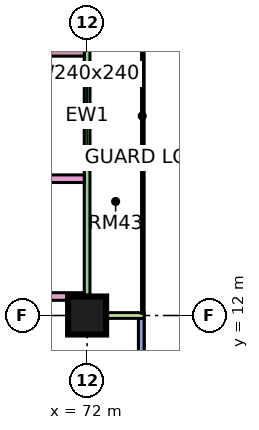
"""IFC4 building model, lengths in metres.
Left out: names, types, materials, properties, quantities, classifications, styles, units other than length and angle.
Written with IfcOpenShell. Run it as: python <this file> out.ifc"""

import sys

from ifc_helpers import new_model, si_unit, direction, frame, frame_2d, origin, origin_2d, place, context, subcontext, project, spatial, rectangle, extrude, element, fill, save


model = new_model("IFC4")
c1 = context("Model", 3, precision=1e-05, world=origin(), true_north=direction((0.0, 1.0)))
c2 = subcontext(c1, "Body", "Model", "MODEL_VIEW")
j1 = project(units=[si_unit("LENGTHUNIT", "METRE"), si_unit("PLANEANGLEUNIT", "RADIAN")], contexts=[c1])
p1 = place(None, origin())
s1 = spatial("IfcSite", under=j1, at=p1, CompositionType="ELEMENT")
p2 = place(p1, origin())
s2 = spatial("IfcBuilding", under=s1, at=p2, CompositionType="ELEMENT")
p3 = place(p2, frame((0.0, 0.0, 114.4)))
s3 = spatial("IfcBuildingStorey", under=s2, at=p3, CompositionType="ELEMENT", Elevation=114.4)
p4 = place(p3, frame((72.0, 12.0, 0.0), z_axis=(0.0, 0.0, 1.0), x_axis=(1.0, 0.0, 0.0)))
e1 = element("IfcColumn", 1, at=p4, inside=s3, PredefinedType="COLUMN", context=c2, shape_type="SweptSolid", body=[
    extrude(rectangle(XDim=1.0, YDim=1.0, at=origin_2d()), origin(), (0.0, 0.0, 1.0), 3.75),
])
p5 = place(p3, frame((73.425, 1.5, 0.0), z_axis=(0.0, 0.0, 1.0), x_axis=(0.0, 1.0, 0.0)))
e2 = element("IfcWall", 2, at=p5, inside=s3, PredefinedType="SOLIDWALL", context=c2, shape_type="SweptSolid", body=[
    extrude(rectangle(XDim=10.425, YDim=0.15, at=frame_2d((5.212, 0.0))), origin(), (0.0, 0.0, 1.0), 3.35),
])
p6 = place(p5, frame((1.3, 0.0, 0.45)))
e3 = element("IfcOpeningElement", 3, at=p6, cuts=e2, PredefinedType="OPENING", context=c2, shape_type="SweptSolid", body=[
    extrude(rectangle(XDim=3.0, YDim=2.4, at=frame_2d((1.5, 1.2))), frame((0.0, 0.085, 0.0), z_axis=(0.0, -1.0, 0.0), x_axis=(1.0, 0.0, 0.0)), (0.0, 0.0, 1.0), 0.17),
])
p7 = place(p5, frame((8.012, 0.0, 1.7)))
e4 = element("IfcOpeningElement", 4, at=p7, cuts=e2, PredefinedType="OPENING", context=c2, shape_type="SweptSolid", body=[
    extrude(rectangle(XDim=1.2, YDim=0.9, at=frame_2d((0.6, 0.45))), frame((0.0, 0.085, 0.0), z_axis=(0.0, -1.0, 0.0), x_axis=(1.0, 0.0, 0.0)), (0.0, 0.0, 1.0), 0.17),
])
p8 = place(p3, frame((72.0, 12.075, 0.0), z_axis=(0.0, 0.0, 1.0), x_axis=(0.0, 1.0, 0.0)))
e5 = element("IfcWall", 5, at=p8, inside=s3, PredefinedType="SOLIDWALL", context=c2, shape_type="SweptSolid", body=[
    extrude(rectangle(XDim=10.35, YDim=0.15, at=frame_2d((5.175, 0.0))), origin(), (0.0, 0.0, 1.0), 3.35),
])
p9 = place(p8, frame((3.975, 0.0, 0.45)))
e6 = element("IfcOpeningElement", 6, at=p9, cuts=e5, PredefinedType="OPENING", context=c2, shape_type="SweptSolid", body=[
    extrude(rectangle(XDim=2.4, YDim=2.4, at=frame_2d((1.2, 1.2))), frame((0.0, 0.085, 0.0), z_axis=(0.0, -1.0, 0.0), x_axis=(1.0, 0.0, 0.0)), (0.0, 0.0, 1.0), 0.17),
])
p10 = place(p8, frame((7.688, 0.0, 0.0)))
e7 = element("IfcOpeningElement", 7, at=p10, cuts=e5, PredefinedType="OPENING", context=c2, shape_type="SweptSolid", body=[
    extrude(rectangle(XDim=1.8, YDim=2.4, at=frame_2d((0.9, 1.2))), frame((0.0, 0.085, 0.0), z_axis=(0.0, -1.0, 0.0), x_axis=(1.0, 0.0, 0.0)), (0.0, 0.0, 1.0), 0.17),
])
p11 = place(p3, frame((73.5, 12.0, 0.0), z_axis=(0.0, 0.0, 1.0), x_axis=(-1.0, 0.0, 0.0)))
e8 = element("IfcWall", 8, at=p11, inside=s3, PredefinedType="SOLIDWALL", context=c2, shape_type="SweptSolid", body=[
    extrude(rectangle(XDim=1.5, YDim=0.15, at=frame_2d((0.75, 0.0))), origin(), (0.0, 0.0, 1.0), 3.35),
])
p12 = place(p3, frame((40.65, 12.5, 0.0), z_axis=(0.0, 0.0, 1.0), x_axis=(1.0, 0.0, 0.0)))
e9 = element("IfcWall", 9, at=p12, inside=s3, PredefinedType="PARTITIONING", context=c2, shape_type="SweptSolid", body=[
    extrude(rectangle(XDim=31.276, YDim=0.2, at=frame_2d((15.638, 0.0))), origin(), (0.0, 0.0, 1.0), 3.35),
])
p13 = place(p12, frame((20.7, 0.0, 0.0)))
e10 = element("IfcOpeningElement", 10, at=p13, cuts=e9, PredefinedType="OPENING", context=c2, shape_type="SweptSolid", body=[
    extrude(rectangle(XDim=1.0, YDim=2.1, at=frame_2d((0.5, 1.05))), frame((0.0, 0.11, 0.0), z_axis=(0.0, -1.0, 0.0), x_axis=(1.0, 0.0, 0.0)), (0.0, 0.0, 1.0), 0.22),
])
p14 = place(p12, frame((1.05, 0.0, 0.0)))
e11 = element("IfcOpeningElement", 11, at=p14, cuts=e9, PredefinedType="OPENING", context=c2, shape_type="SweptSolid", body=[
    extrude(rectangle(XDim=1.0, YDim=2.1, at=frame_2d((0.5, 1.05))), frame((0.0, 0.11, 0.0), z_axis=(0.0, -1.0, 0.0), x_axis=(1.0, 0.0, 0.0)), (0.0, 0.0, 1.0), 0.22),
])
p15 = place(p3, frame((51.225, 15.6, 0.0), z_axis=(0.0, 0.0, 1.0), x_axis=(1.0, 0.0, 0.0)))
e12 = element("IfcWall", 12, at=p15, inside=s3, PredefinedType="PARTITIONING", context=c2, shape_type="SweptSolid", body=[
    extrude(rectangle(XDim=20.701, YDim=0.2, at=frame_2d((10.351, 0.0))), origin(), (0.0, 0.0, 1.0), 3.35),
])
p16 = place(p15, frame((9.725, 0.0, 0.0)))
e13 = element("IfcOpeningElement", 13, at=p16, cuts=e12, PredefinedType="OPENING", context=c2, shape_type="SweptSolid", body=[
    extrude(rectangle(XDim=1.0, YDim=2.1, at=frame_2d((0.5, 1.05))), frame((0.0, 0.11, 0.0), z_axis=(0.0, -1.0, 0.0), x_axis=(1.0, 0.0, 0.0)), (0.0, 0.0, 1.0), 0.22),
])
p17 = place(p15, frame((0.875, 0.0, 0.0)))
e14 = element("IfcOpeningElement", 14, at=p17, cuts=e12, PredefinedType="OPENING", context=c2, shape_type="SweptSolid", body=[
    extrude(rectangle(XDim=1.0, YDim=2.1, at=frame_2d((0.5, 1.05))), frame((0.0, 0.11, 0.0), z_axis=(0.0, -1.0, 0.0), x_axis=(1.0, 0.0, 0.0)), (0.0, 0.0, 1.0), 0.22),
])
p18 = place(p3, frame((62.625, 18.9, 0.0), z_axis=(0.0, 0.0, 1.0), x_axis=(1.0, 0.0, 0.0)))
e15 = element("IfcWall", 15, at=p18, inside=s3, PredefinedType="PARTITIONING", context=c2, shape_type="SweptSolid", body=[
    extrude(rectangle(XDim=9.301, YDim=0.15, at=frame_2d((4.65, 0.0))), origin(), (0.0, 0.0, 1.0), 3.35),
])
p19 = place(p18, frame((5.775, 0.0, 0.0)))
e16 = element("IfcOpeningElement", 16, at=p19, cuts=e15, PredefinedType="OPENING", context=c2, shape_type="SweptSolid", body=[
    extrude(rectangle(XDim=0.9, YDim=2.1, at=frame_2d((0.45, 1.05))), frame((0.0, 0.085, 0.0), z_axis=(0.0, -1.0, 0.0), x_axis=(1.0, 0.0, 0.0)), (0.0, 0.0, 1.0), 0.17),
])
p20 = place(p9, origin())
e17 = element("IfcWindow", 17, at=p20, inside=s3, PartitioningType="SINGLE_PANEL", PredefinedType="WINDOW", context=c2, shape_type="SweptSolid", body=[
    extrude(rectangle(XDim=2.4, YDim=2.4, at=frame_2d((1.2, 1.2))), frame((0.0, 0.03, 0.0), z_axis=(0.0, -1.0, 0.0), x_axis=(1.0, 0.0, 0.0)), (0.0, 0.0, 1.0), 0.06),
])
fill(e6, e17)
save(model, sys.argv[1])
